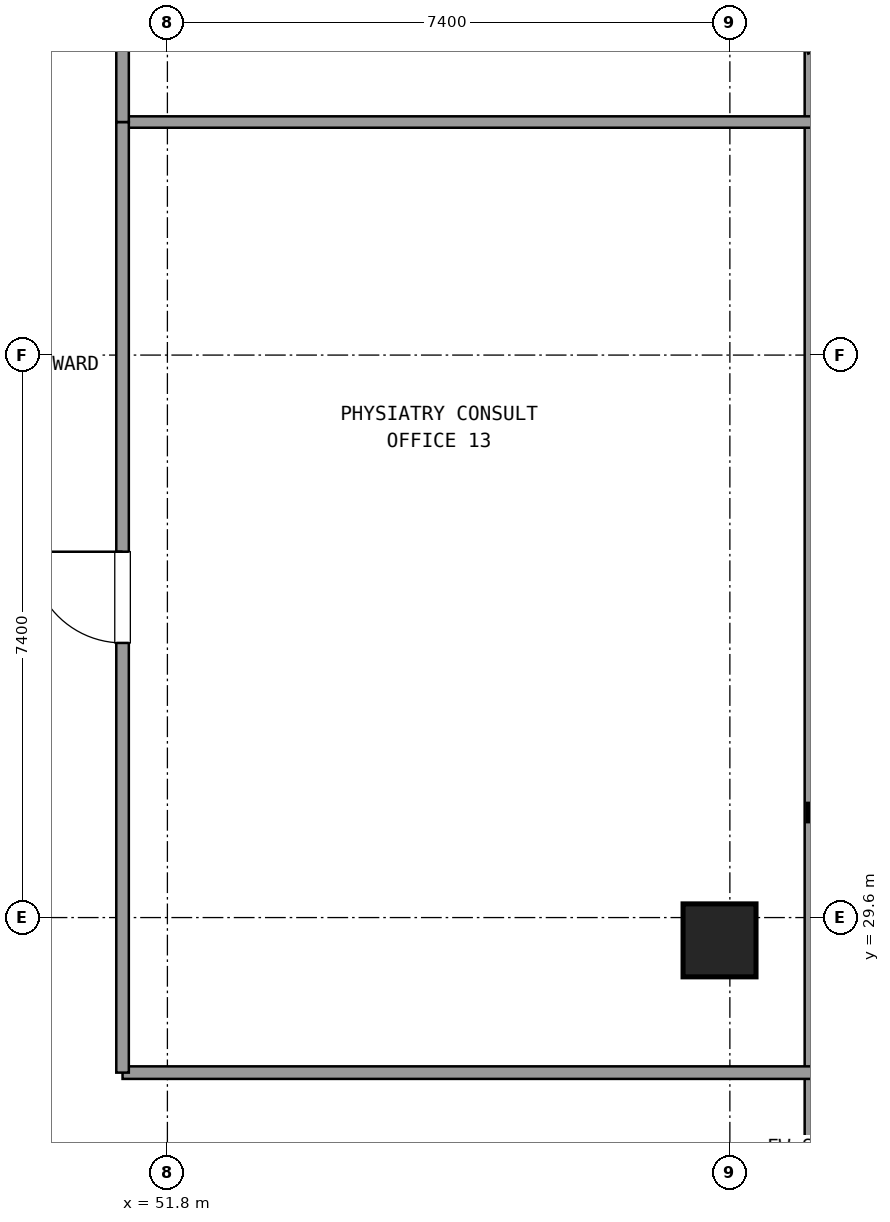
"""IFC4 building model, lengths in metres.
Left out: names, types, materials, properties, quantities, classifications, styles, units other than length and angle.
Written with IfcOpenShell. Run it as: python <this file> out.ifc"""

import sys

from ifc_helpers import new_model, si_unit, direction, frame, frame_2d, origin, origin_2d, place, context, subcontext, project, spatial, rectangle, extrude, element, fill, save


model = new_model("IFC4")
c1 = context("Model", 3, precision=1e-05, world=origin(), true_north=direction((0.0, 1.0)))
c2 = subcontext(c1, "Body", "Model", "MODEL_VIEW")
j1 = project(units=[si_unit("LENGTHUNIT", "METRE"), si_unit("PLANEANGLEUNIT", "RADIAN")], contexts=[c1])
p1 = place(None, origin())
s1 = spatial("IfcSite", under=j1, at=p1, CompositionType="ELEMENT")
p2 = place(p1, origin())
s2 = spatial("IfcBuilding", under=s1, at=p2, CompositionType="ELEMENT")
p3 = place(p2, frame((0.0, 0.0, 167.22)))
s3 = spatial("IfcBuildingStorey", under=s2, at=p3, CompositionType="ELEMENT", Elevation=167.22)
p4 = place(p3, frame((59.064, 29.3, 0.0), z_axis=(0.0, 0.0, 1.0), x_axis=(1.0, 0.0, 0.0)))
e1 = element("IfcColumn", 1, at=p4, inside=s3, PredefinedType="COLUMN", context=c2, shape_type="SweptSolid", body=[
    extrude(rectangle(XDim=0.96, YDim=0.96, at=origin_2d()), origin(), (0.0, 0.0, 1.0), 3.6),
])
p5 = place(p3, frame((60.304, 10.655, 0.0), z_axis=(0.0, 0.0, 1.0), x_axis=(0.0, 1.0, 0.0)))
e2 = element("IfcWall", 2, at=p5, inside=s3, PredefinedType="SOLIDWALL", context=c2, shape_type="SweptSolid", body=[
    extrude(rectangle(XDim=30.49, YDim=0.24, at=frame_2d((15.245, 0.0))), origin(), (0.0, 0.0, 1.0), 0.85),
])
p6 = place(p3, frame((51.21, 27.56, 0.0), z_axis=(0.0, 0.0, 1.0), x_axis=(1.0, 0.0, 0.0)))
e3 = element("IfcWall", 3, at=p6, inside=s3, PredefinedType="PARTITIONING", context=c2, shape_type="SweptSolid", body=[
    extrude(rectangle(XDim=9.074, YDim=0.165, at=frame_2d((4.537, 0.0))), origin(), (0.0, 0.0, 1.0), 2.61),
])
p7 = place(p3, frame((51.21, 40.066, 0.0), z_axis=(0.0, 0.0, 1.0), x_axis=(1.0, 0.0, 0.0)))
e4 = element("IfcWall", 4, at=p7, inside=s3, PredefinedType="PARTITIONING", context=c2, shape_type="SweptSolid", body=[
    extrude(rectangle(XDim=9.074, YDim=0.15, at=frame_2d((4.537, 0.0))), origin(), (0.0, 0.0, 1.0), 2.61),
])
p8 = place(p3, frame((51.21, 27.56, 0.0), z_axis=(0.0, 0.0, 1.0), x_axis=(0.0, 1.0, 0.0)))
e5 = element("IfcWall", 5, at=p8, inside=s3, PredefinedType="PARTITIONING", context=c2, shape_type="SweptSolid", body=[
    extrude(rectangle(XDim=12.506, YDim=0.165, at=frame_2d((6.253, 0.0))), origin(), (0.0, 0.0, 1.0), 2.61),
])
p9 = place(p8, frame((5.653, 0.0, 0.0)))
e6 = element("IfcOpeningElement", 6, at=p9, cuts=e5, PredefinedType="OPENING", context=c2, shape_type="SweptSolid", body=[
    extrude(rectangle(XDim=1.2, YDim=2.15, at=frame_2d((0.6, 1.075))), frame((0.0, 0.093, 0.0), z_axis=(0.0, -1.0, 0.0), x_axis=(1.0, 0.0, 0.0)), (0.0, 0.0, 1.0), 0.185),
])
p10 = place(p3, frame((51.21, 40.066, 0.0), z_axis=(0.0, 0.0, 1.0), x_axis=(0.0, 1.0, 0.0)))
e7 = element("IfcWall", 7, at=p10, inside=s3, PredefinedType="PARTITIONING", context=c2, shape_type="SweptSolid", body=[
    extrude(rectangle(XDim=7.034, YDim=0.165, at=frame_2d((3.517, 0.0))), origin(), (0.0, 0.0, 1.0), 2.61),
])
p11 = place(p10, frame((2.917, 0.0, 0.0)))
e8 = element("IfcOpeningElement", 8, at=p11, cuts=e7, PredefinedType="OPENING", context=c2, shape_type="SweptSolid", body=[
    extrude(rectangle(XDim=1.2, YDim=2.15, at=frame_2d((0.6, 1.075))), frame((0.0, 0.093, 0.0), z_axis=(0.0, -1.0, 0.0), x_axis=(1.0, 0.0, 0.0)), (0.0, 0.0, 1.0), 0.185),
])
p12 = place(p9, origin())
e9 = element("IfcDoor", 9, at=p12, inside=s3, OperationType="SINGLE_SWING_RIGHT", PredefinedType="DOOR", context=c2, shape_type="SweptSolid", body=[
    extrude(rectangle(XDim=1.2, YDim=2.15, at=frame_2d((0.6, 1.075))), frame((0.0, 0.025, 0.0), z_axis=(0.0, -1.0, 0.0), x_axis=(1.0, 0.0, 0.0)), (0.0, 0.0, 1.0), 0.05),
])
fill(e6, e9)
save(model, sys.argv[1])
